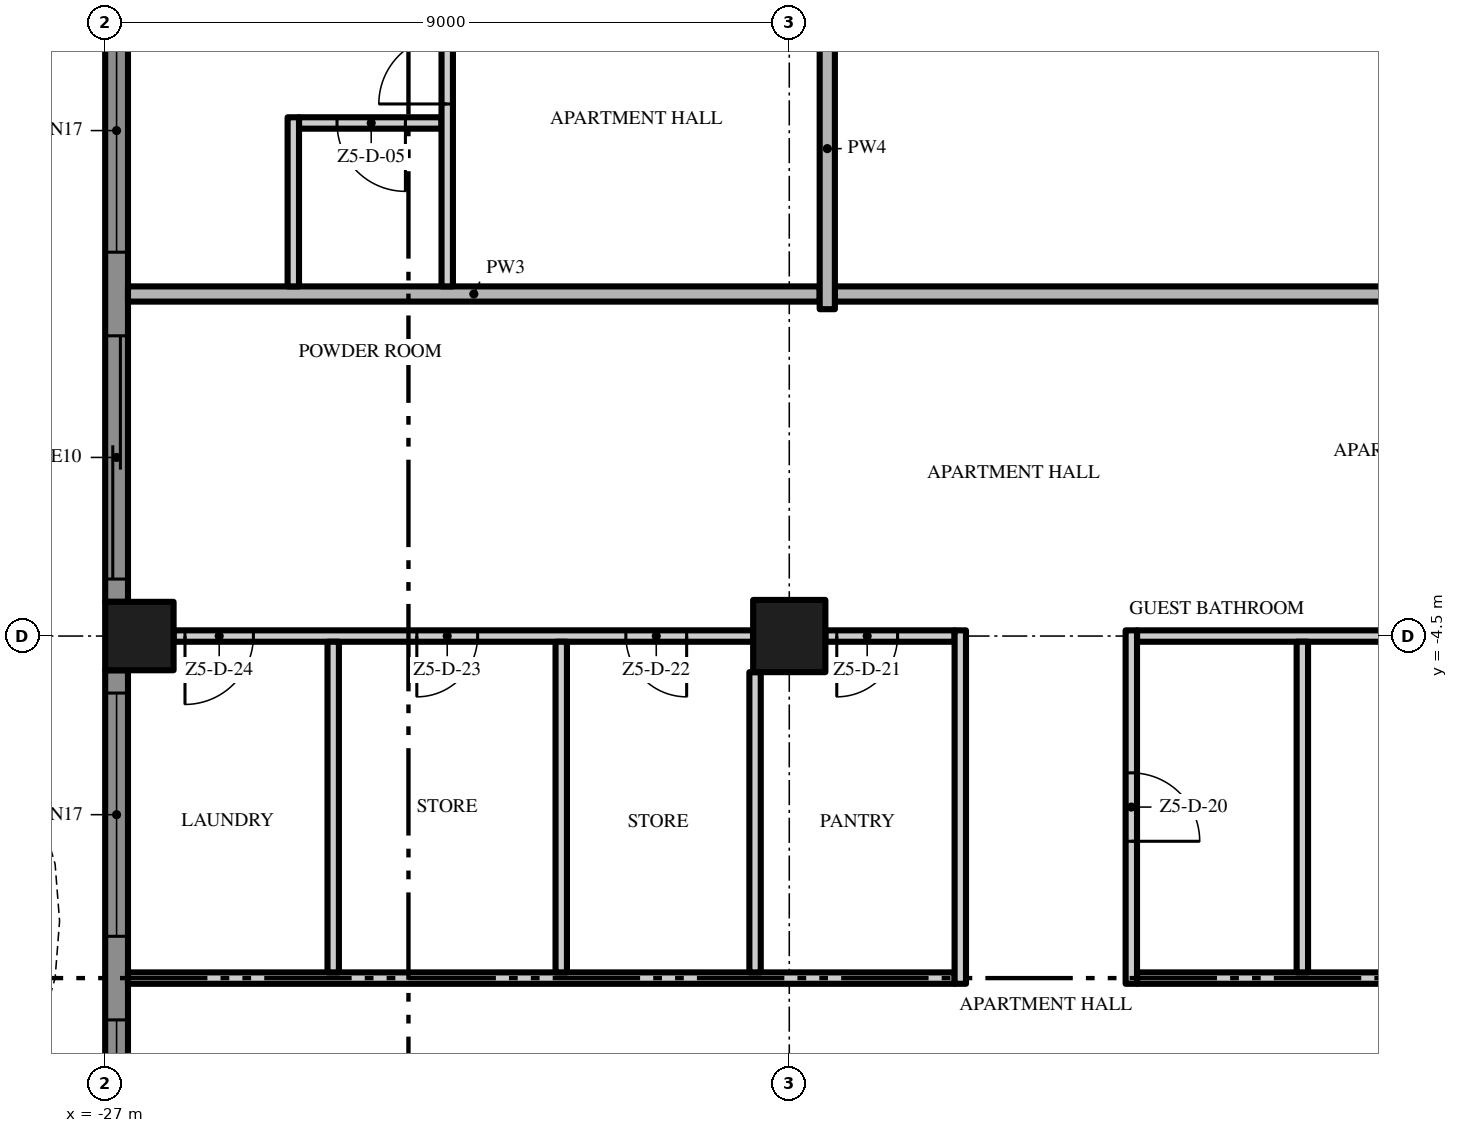
"""IFC4 building model, lengths in metres.
Left out: names, types, materials, properties, quantities, classifications, styles, units other than length and angle.
Written with IfcOpenShell. Run it as: python <this file> out.ifc"""

import sys

from ifc_helpers import new_model, si_unit, direction, frame, frame_2d, origin, origin_2d, place, context, subcontext, project, spatial, polyline, rectangle, outline, extrude, element, fill, save


model = new_model("IFC4")
c1 = context("Model", 3, precision=1e-05, world=origin(), true_north=direction((0.0, 1.0)))
c2 = subcontext(c1, "Body", "Model", "MODEL_VIEW")
j1 = project(units=[si_unit("LENGTHUNIT", "METRE"), si_unit("PLANEANGLEUNIT", "RADIAN")], contexts=[c1])
p1 = place(None, origin())
s1 = spatial("IfcSite", under=j1, at=p1, CompositionType="ELEMENT")
p2 = place(p1, origin())
s2 = spatial("IfcBuilding", under=s1, at=p2, CompositionType="ELEMENT")
p3 = place(p2, frame((0.0, 0.0, 273.0)))
s3 = spatial("IfcBuildingStorey", under=s2, at=p3, CompositionType="ELEMENT", Elevation=273.0)
p4 = place(p3, frame((-18.0, -4.5, 0.0), z_axis=(0.0, 0.0, 1.0), x_axis=(1.0, 0.0, 0.0)))
e1 = element("IfcColumn", 1, at=p4, inside=s3, PredefinedType="COLUMN", context=c2, shape_type="SweptSolid", body=[
    extrude(rectangle(XDim=0.95, YDim=0.95, at=origin_2d()), origin(), (0.0, 0.0, 1.0), 3.5),
])
p5 = place(p3, frame((-26.55, -4.5, 0.0), z_axis=(0.0, 0.0, 1.0), x_axis=(1.0, 0.0, 0.0)))
e2 = element("IfcColumn", 2, at=p5, inside=s3, PredefinedType="COLUMN", context=c2, shape_type="SweptSolid", body=[
    extrude(rectangle(XDim=0.9, YDim=0.9, at=origin_2d()), origin(), (0.0, 0.0, 1.0), 3.5),
])
p6 = place(p3, frame((-26.85, -4.05, 0.0), z_axis=(0.0, 0.0, 1.0), x_axis=(0.0, 1.0, 0.0)))
e3 = element("IfcWall", 3, at=p6, inside=s3, PredefinedType="SOLIDWALL", context=c2, shape_type="SweptSolid", body=[
    extrude(rectangle(XDim=8.1, YDim=0.3, at=frame_2d((4.05, 0.0))), origin(), (0.0, 0.0, 1.0), 3.5),
])
p7 = place(p6, frame((4.6, 0.0, 0.45)))
e4 = element("IfcOpeningElement", 4, at=p7, cuts=e3, PredefinedType="OPENING", context=c2, shape_type="SweptSolid", body=[
    extrude(rectangle(XDim=3.2, YDim=2.65, at=frame_2d((1.6, 1.325))), frame((0.0, 0.16, 0.0), z_axis=(0.0, -1.0, 0.0), x_axis=(1.0, 0.0, 0.0)), (0.0, 0.0, 1.0), 0.32),
])
p8 = place(p6, frame((0.3, 0.0, 0.0)))
e5 = element("IfcOpeningElement", 5, at=p8, cuts=e3, PredefinedType="OPENING", context=c2, shape_type="SweptSolid", body=[
    extrude(rectangle(XDim=3.2, YDim=2.4, at=frame_2d((1.6, 1.2))), frame((0.0, 0.16, 0.0), z_axis=(0.0, -1.0, 0.0), x_axis=(1.0, 0.0, 0.0)), (0.0, 0.0, 1.0), 0.32),
])
p9 = place(p3, frame((-26.85, -13.05, 0.0), z_axis=(0.0, 0.0, 1.0), x_axis=(0.0, 1.0, 0.0)))
e6 = element("IfcWall", 6, at=p9, inside=s3, PredefinedType="SOLIDWALL", context=c2, shape_type="SweptSolid", body=[
    extrude(rectangle(XDim=8.1, YDim=0.3, at=frame_2d((4.05, 0.0))), origin(), (0.0, 0.0, 1.0), 3.5),
])
p10 = place(p9, frame((4.6, 0.0, 0.45)))
e7 = element("IfcOpeningElement", 7, at=p10, cuts=e6, PredefinedType="OPENING", context=c2, shape_type="SweptSolid", body=[
    extrude(rectangle(XDim=3.2, YDim=2.65, at=frame_2d((1.6, 1.325))), frame((0.0, 0.16, 0.0), z_axis=(0.0, -1.0, 0.0), x_axis=(1.0, 0.0, 0.0)), (0.0, 0.0, 1.0), 0.32),
])
p11 = place(p9, frame((0.3, 0.0, 0.45)))
e8 = element("IfcOpeningElement", 8, at=p11, cuts=e6, PredefinedType="OPENING", context=c2, shape_type="SweptSolid", body=[
    extrude(rectangle(XDim=3.2, YDim=2.65, at=frame_2d((1.6, 1.325))), frame((0.0, 0.16, 0.0), z_axis=(0.0, -1.0, 0.0), x_axis=(1.0, 0.0, 0.0)), (0.0, 0.0, 1.0), 0.32),
])
p12 = place(p3, origin())
e9 = element("IfcWall", 9, at=p12, inside=s3, PredefinedType="USERDEFINED", context=c2, shape_type="SweptSolid", body=[
    extrude(outline(polyline([(-28.8, 18.0), (-29.505, 16.5), (-29.941, 15.0), (-30.0, 14.25), (-29.941, 13.5), (-29.505, 12.0), (-28.8, 10.5), (-28.095, 9.0), (-27.659, 7.5), (-27.6, 6.75), (-27.659, 6.0), (-28.095, 4.5), (-28.8, 3.0), (-29.505, 1.5), (-29.941, 0.0), (-30.0, -0.75), (-29.941, -1.5), (-29.505, -3.0), (-28.8, -4.5), (-28.095, -6.0), (-27.659, -7.5), (-27.6, -8.25), (-27.659, -9.0), (-28.095, -10.5), (-28.8, -12.0), (-29.505, -13.5), (-29.941, -15.0), (-30.0, -15.75), (-29.941, -16.5), (-29.505, -18.0), (-29.265, -17.93), (-29.694, -16.455), (-29.749, -15.75), (-29.694, -15.045), (-29.271, -13.589), (-28.574, -12.106), (-27.86, -10.589), (-27.411, -9.045), (-27.349, -8.25), (-27.411, -7.455), (-27.86, -5.911), (-28.574, -4.394), (-29.271, -2.911), (-29.694, -1.455), (-29.749, -0.75), (-29.694, -0.045), (-29.271, 1.411), (-28.574, 2.894), (-27.86, 4.411), (-27.411, 5.955), (-27.349, 6.75), (-27.411, 7.545), (-27.86, 9.089), (-28.574, 10.606), (-29.271, 12.089), (-29.694, 13.545), (-29.749, 14.25), (-29.694, 14.955), (-29.271, 16.411), (-28.574, 17.894), (-28.8, 18.0)])), origin(), (0.0, 0.0, 1.0), 0.9),
])
p13 = place(p3, frame((-26.7, -9.0, 0.0), z_axis=(0.0, 0.0, 1.0), x_axis=(1.0, 0.0, 0.0)))
e10 = element("IfcWall", 10, at=p13, inside=s3, PredefinedType="PARTITIONING", context=c2, shape_type="SweptSolid", body=[
    extrude(rectangle(XDim=10.875, YDim=0.15, at=frame_2d((5.438, 0.0))), origin(), (0.0, 0.0, 1.0), 3.5),
])
p14 = place(p3, frame((-13.425, -9.0, 0.0), z_axis=(0.0, 0.0, 1.0), x_axis=(1.0, 0.0, 0.0)))
e11 = element("IfcWall", 11, at=p14, inside=s3, PredefinedType="PARTITIONING", context=c2, shape_type="SweptSolid", body=[
    extrude(rectangle(XDim=13.325, YDim=0.15, at=frame_2d((6.662, 0.0))), origin(), (0.0, 0.0, 1.0), 3.5),
])
p15 = place(p14, frame((4.675, 0.0, 0.0)))
e12 = element("IfcOpeningElement", 12, at=p15, cuts=e11, PredefinedType="OPENING", context=c2, shape_type="SweptSolid", body=[
    extrude(rectangle(XDim=1.0, YDim=2.4, at=frame_2d((0.5, 1.2))), frame((0.0, 0.085, 0.0), z_axis=(0.0, -1.0, 0.0), x_axis=(1.0, 0.0, 0.0)), (0.0, 0.0, 1.0), 0.17),
])
p16 = place(p3, frame((-18.475, -4.5, 0.0), z_axis=(0.0, 0.0, 1.0), x_axis=(-1.0, 0.0, 0.0)))
e13 = element("IfcWall", 13, at=p16, inside=s3, PredefinedType="PARTITIONING", context=c2, shape_type="SweptSolid", body=[
    extrude(rectangle(XDim=7.625, YDim=0.15, at=frame_2d((3.812, 0.0))), origin(), (0.0, 0.0, 1.0), 3.5),
])
p17 = place(p16, frame((0.875, 0.0, 0.0)))
e14 = element("IfcOpeningElement", 14, at=p17, cuts=e13, PredefinedType="OPENING", context=c2, shape_type="SweptSolid", body=[
    extrude(rectangle(XDim=0.8, YDim=2.0, at=frame_2d((0.4, 1.0))), frame((0.0, 0.085, 0.0), z_axis=(0.0, -1.0, 0.0), x_axis=(1.0, 0.0, 0.0)), (0.0, 0.0, 1.0), 0.17),
])
p18 = place(p16, frame((3.625, 0.0, 0.0)))
e15 = element("IfcOpeningElement", 15, at=p18, cuts=e13, PredefinedType="OPENING", context=c2, shape_type="SweptSolid", body=[
    extrude(rectangle(XDim=0.8, YDim=2.0, at=frame_2d((0.4, 1.0))), frame((0.0, 0.085, 0.0), z_axis=(0.0, -1.0, 0.0), x_axis=(1.0, 0.0, 0.0)), (0.0, 0.0, 1.0), 0.17),
])
p19 = place(p16, frame((6.575, 0.0, 0.0)))
e16 = element("IfcOpeningElement", 16, at=p19, cuts=e13, PredefinedType="OPENING", context=c2, shape_type="SweptSolid", body=[
    extrude(rectangle(XDim=0.9, YDim=2.1, at=frame_2d((0.45, 1.05))), frame((0.0, 0.085, 0.0), z_axis=(0.0, -1.0, 0.0), x_axis=(1.0, 0.0, 0.0)), (0.0, 0.0, 1.0), 0.17),
])
p20 = place(p3, frame((-15.825, -4.5, 0.0), z_axis=(0.0, 0.0, 1.0), x_axis=(-1.0, 0.0, 0.0)))
e17 = element("IfcWall", 17, at=p20, inside=s3, PredefinedType="PARTITIONING", context=c2, shape_type="SweptSolid", body=[
    extrude(rectangle(XDim=1.7, YDim=0.15, at=frame_2d((0.85, 0.0))), origin(), (0.0, 0.0, 1.0), 3.5),
])
p21 = place(p20, frame((0.75, 0.0, 0.0)))
e18 = element("IfcOpeningElement", 18, at=p21, cuts=e17, PredefinedType="OPENING", context=c2, shape_type="SweptSolid", body=[
    extrude(rectangle(XDim=0.8, YDim=2.0, at=frame_2d((0.4, 1.0))), frame((0.0, 0.085, 0.0), z_axis=(0.0, -1.0, 0.0), x_axis=(1.0, 0.0, 0.0)), (0.0, 0.0, 1.0), 0.17),
])
p22 = place(p3, frame((-13.425, -4.5, 0.0), z_axis=(0.0, 0.0, 1.0), x_axis=(1.0, 0.0, 0.0)))
e19 = element("IfcWall", 19, at=p22, inside=s3, PredefinedType="PARTITIONING", context=c2, shape_type="SweptSolid", body=[
    extrude(rectangle(XDim=3.95, YDim=0.15, at=frame_2d((1.975, 0.0))), origin(), (0.0, 0.0, 1.0), 3.5),
])
p23 = place(p3, frame((17.4, 0.0, 0.0), z_axis=(0.0, 0.0, 1.0), x_axis=(-1.0, 0.0, 0.0)))
e20 = element("IfcWall", 20, at=p23, inside=s3, PredefinedType="PARTITIONING", context=c2, shape_type="SweptSolid", body=[
    extrude(rectangle(XDim=34.8, YDim=0.2, at=frame_2d((17.4, 0.0))), origin(), (0.0, 0.0, 1.0), 3.5),
])
p24 = place(p23, frame((25.65, 0.0, 0.0)))
e21 = element("IfcOpeningElement", 21, at=p24, cuts=e20, PredefinedType="OPENING", context=c2, shape_type="SweptSolid", body=[
    extrude(rectangle(XDim=1.5, YDim=2.4, at=frame_2d((0.75, 1.2))), frame((0.0, 0.11, 0.0), z_axis=(0.0, -1.0, 0.0), x_axis=(1.0, 0.0, 0.0)), (0.0, 0.0, 1.0), 0.22),
])
p25 = place(p23, frame((7.65, 0.0, 0.0)))
e22 = element("IfcOpeningElement", 22, at=p25, cuts=e20, PredefinedType="OPENING", context=c2, shape_type="SweptSolid", body=[
    extrude(rectangle(XDim=1.5, YDim=2.4, at=frame_2d((0.75, 1.2))), frame((0.0, 0.11, 0.0), z_axis=(0.0, -1.0, 0.0), x_axis=(1.0, 0.0, 0.0)), (0.0, 0.0, 1.0), 0.22),
])
p26 = place(p3, frame((-26.7, 0.0, 0.0), z_axis=(0.0, 0.0, 1.0), x_axis=(1.0, 0.0, 0.0)))
e23 = element("IfcWall", 23, at=p26, inside=s3, PredefinedType="PARTITIONING", context=c2, shape_type="SweptSolid", body=[
    extrude(rectangle(XDim=9.1, YDim=0.2, at=frame_2d((4.55, 0.0))), origin(), (0.0, 0.0, 1.0), 3.5),
])
p27 = place(p3, frame((-22.575, 2.25, 0.0), z_axis=(0.0, 0.0, 1.0), x_axis=(-1.0, 0.0, 0.0)))
e24 = element("IfcWall", 24, at=p27, inside=s3, PredefinedType="PARTITIONING", context=c2, shape_type="SweptSolid", body=[
    extrude(rectangle(XDim=1.875, YDim=0.15, at=frame_2d((0.938, 0.0))), origin(), (0.0, 0.0, 1.0), 3.5),
])
p28 = place(p27, frame((0.475, 0.0, 0.0)))
e25 = element("IfcOpeningElement", 25, at=p28, cuts=e24, PredefinedType="OPENING", context=c2, shape_type="SweptSolid", body=[
    extrude(rectangle(XDim=0.9, YDim=2.1, at=frame_2d((0.45, 1.05))), frame((0.0, 0.085, 0.0), z_axis=(0.0, -1.0, 0.0), x_axis=(1.0, 0.0, 0.0)), (0.0, 0.0, 1.0), 0.17),
])
p29 = place(p3, frame((-24.525, 0.1, 0.0), z_axis=(0.0, 0.0, 1.0), x_axis=(0.0, 1.0, 0.0)))
e26 = element("IfcWall", 26, at=p29, inside=s3, PredefinedType="PARTITIONING", context=c2, shape_type="SweptSolid", body=[
    extrude(rectangle(XDim=2.225, YDim=0.15, at=frame_2d((1.113, 0.0))), origin(), (0.0, 0.0, 1.0), 3.5),
])
p30 = place(p3, frame((-24.0, -8.925, 0.0), z_axis=(0.0, 0.0, 1.0), x_axis=(0.0, 1.0, 0.0)))
e27 = element("IfcWall", 27, at=p30, inside=s3, PredefinedType="PARTITIONING", context=c2, shape_type="SweptSolid", body=[
    extrude(rectangle(XDim=4.35, YDim=0.15, at=frame_2d((2.175, 0.0))), origin(), (0.0, 0.0, 1.0), 3.5),
])
p31 = place(p3, frame((-22.5, 0.1, 0.0), z_axis=(0.0, 0.0, 1.0), x_axis=(0.0, 1.0, 0.0)))
e28 = element("IfcWall", 28, at=p31, inside=s3, PredefinedType="PARTITIONING", context=c2, shape_type="SweptSolid", body=[
    extrude(rectangle(XDim=17.45, YDim=0.15, at=frame_2d((8.725, 0.0))), origin(), (0.0, 0.0, 1.0), 3.5),
])
p32 = place(p31, frame((2.4, 0.0, 0.0)))
e29 = element("IfcOpeningElement", 29, at=p32, cuts=e28, PredefinedType="OPENING", context=c2, shape_type="SweptSolid", body=[
    extrude(rectangle(XDim=1.8, YDim=2.4, at=frame_2d((0.9, 1.2))), frame((0.0, 0.085, 0.0), z_axis=(0.0, -1.0, 0.0), x_axis=(1.0, 0.0, 0.0)), (0.0, 0.0, 1.0), 0.17),
])
p33 = place(p31, frame((10.65, 0.0, 0.0)))
e30 = element("IfcOpeningElement", 30, at=p33, cuts=e28, PredefinedType="OPENING", context=c2, shape_type="SweptSolid", body=[
    extrude(rectangle(XDim=1.0, YDim=2.4, at=frame_2d((0.5, 1.2))), frame((0.0, 0.085, 0.0), z_axis=(0.0, -1.0, 0.0), x_axis=(1.0, 0.0, 0.0)), (0.0, 0.0, 1.0), 0.17),
])
p34 = place(p3, frame((-21.0, -8.925, 0.0), z_axis=(0.0, 0.0, 1.0), x_axis=(0.0, 1.0, 0.0)))
e31 = element("IfcWall", 31, at=p34, inside=s3, PredefinedType="PARTITIONING", context=c2, shape_type="SweptSolid", body=[
    extrude(rectangle(XDim=4.35, YDim=0.15, at=frame_2d((2.175, 0.0))), origin(), (0.0, 0.0, 1.0), 3.5),
])
p35 = place(p3, frame((-18.45, -8.925, 0.0), z_axis=(0.0, 0.0, 1.0), x_axis=(0.0, 1.0, 0.0)))
e32 = element("IfcWall", 32, at=p35, inside=s3, PredefinedType="PARTITIONING", context=c2, shape_type="SweptSolid", body=[
    extrude(rectangle(XDim=3.95, YDim=0.15, at=frame_2d((1.975, 0.0))), origin(), (0.0, 0.0, 1.0), 3.5),
])
p36 = place(p3, frame((-17.5, -0.2, 0.0), z_axis=(0.0, 0.0, 1.0), x_axis=(0.0, 1.0, 0.0)))
e33 = element("IfcWall", 33, at=p36, inside=s3, PredefinedType="PARTITIONING", context=c2, shape_type="SweptSolid", body=[
    extrude(rectangle(XDim=4.225, YDim=0.2, at=frame_2d((2.112, 0.0))), origin(), (0.0, 0.0, 1.0), 3.5),
])
p37 = place(p3, frame((-15.75, -9.075, 0.0), z_axis=(0.0, 0.0, 1.0), x_axis=(0.0, 1.0, 0.0)))
e34 = element("IfcWall", 34, at=p37, inside=s3, PredefinedType="PARTITIONING", context=c2, shape_type="SweptSolid", body=[
    extrude(rectangle(XDim=4.65, YDim=0.15, at=frame_2d((2.325, 0.0))), origin(), (0.0, 0.0, 1.0), 3.5),
])
p38 = place(p3, frame((-13.5, -4.425, 0.0), z_axis=(0.0, 0.0, 1.0), x_axis=(0.0, -1.0, 0.0)))
e35 = element("IfcWall", 35, at=p38, inside=s3, PredefinedType="PARTITIONING", context=c2, shape_type="SweptSolid", body=[
    extrude(rectangle(XDim=4.65, YDim=0.15, at=frame_2d((2.325, 0.0))), origin(), (0.0, 0.0, 1.0), 3.5),
])
p39 = place(p38, frame((1.875, 0.0, 0.0)))
e36 = element("IfcOpeningElement", 36, at=p39, cuts=e35, PredefinedType="OPENING", context=c2, shape_type="SweptSolid", body=[
    extrude(rectangle(XDim=0.9, YDim=2.1, at=frame_2d((0.45, 1.05))), frame((0.0, 0.085, 0.0), z_axis=(0.0, -1.0, 0.0), x_axis=(1.0, 0.0, 0.0)), (0.0, 0.0, 1.0), 0.17),
])
p40 = place(p3, frame((-11.25, -8.925, 0.0), z_axis=(0.0, 0.0, 1.0), x_axis=(0.0, 1.0, 0.0)))
e37 = element("IfcWall", 37, at=p40, inside=s3, PredefinedType="PARTITIONING", context=c2, shape_type="SweptSolid", body=[
    extrude(rectangle(XDim=4.35, YDim=0.15, at=frame_2d((2.175, 0.0))), origin(), (0.0, 0.0, 1.0), 3.5),
])
p41 = place(p7, origin())
e38 = element("IfcWindow", 38, at=p41, inside=s3, PartitioningType="SINGLE_PANEL", PredefinedType="WINDOW", context=c2, shape_type="SweptSolid", body=[
    extrude(rectangle(XDim=3.2, YDim=2.65, at=frame_2d((1.6, 1.325))), frame((0.0, 0.03, 0.0), z_axis=(0.0, -1.0, 0.0), x_axis=(1.0, 0.0, 0.0)), (0.0, 0.0, 1.0), 0.06),
])
fill(e4, e38)
p42 = place(p8, origin())
e39 = element("IfcDoor", 39, at=p42, inside=s3, OperationType="SINGLE_SWING_LEFT", PredefinedType="DOOR", context=c2, shape_type="SweptSolid", body=[
    extrude(rectangle(XDim=3.2, YDim=2.4, at=frame_2d((1.6, 1.2))), frame((0.0, 0.025, 0.0), z_axis=(0.0, -1.0, 0.0), x_axis=(1.0, 0.0, 0.0)), (0.0, 0.0, 1.0), 0.05),
])
fill(e5, e39)
p43 = place(p10, origin())
e40 = element("IfcWindow", 40, at=p43, inside=s3, PartitioningType="SINGLE_PANEL", PredefinedType="WINDOW", context=c2, shape_type="SweptSolid", body=[
    extrude(rectangle(XDim=3.2, YDim=2.65, at=frame_2d((1.6, 1.325))), frame((0.0, 0.03, 0.0), z_axis=(0.0, -1.0, 0.0), x_axis=(1.0, 0.0, 0.0)), (0.0, 0.0, 1.0), 0.06),
])
fill(e7, e40)
p44 = place(p11, origin())
e41 = element("IfcWindow", 41, at=p44, inside=s3, PartitioningType="SINGLE_PANEL", PredefinedType="WINDOW", context=c2, shape_type="SweptSolid", body=[
    extrude(rectangle(XDim=3.2, YDim=2.65, at=frame_2d((1.6, 1.325))), frame((0.0, 0.03, 0.0), z_axis=(0.0, -1.0, 0.0), x_axis=(1.0, 0.0, 0.0)), (0.0, 0.0, 1.0), 0.06),
])
fill(e8, e41)
p45 = place(p32, origin())
e42 = element("IfcDoor", 42, at=p45, inside=s3, OperationType="DOUBLE_DOOR_SINGLE_SWING", PredefinedType="DOOR", context=c2, shape_type="SweptSolid", body=[
    extrude(rectangle(XDim=1.8, YDim=2.4, at=frame_2d((0.9, 1.2))), frame((0.0, 0.025, 0.0), z_axis=(0.0, -1.0, 0.0), x_axis=(1.0, 0.0, 0.0)), (0.0, 0.0, 1.0), 0.05),
])
fill(e29, e42)
p46 = place(p28, origin())
e43 = element("IfcDoor", 43, at=p46, inside=s3, OperationType="SINGLE_SWING_LEFT", PredefinedType="DOOR", context=c2, shape_type="SweptSolid", body=[
    extrude(rectangle(XDim=0.9, YDim=2.1, at=frame_2d((0.45, 1.05))), frame((0.0, 0.025, 0.0), z_axis=(0.0, -1.0, 0.0), x_axis=(1.0, 0.0, 0.0)), (0.0, 0.0, 1.0), 0.05),
])
fill(e25, e43)
p47 = place(p39, origin())
e44 = element("IfcDoor", 44, at=p47, inside=s3, OperationType="SINGLE_SWING_RIGHT", PredefinedType="DOOR", context=c2, shape_type="SweptSolid", body=[
    extrude(rectangle(XDim=0.9, YDim=2.1, at=frame_2d((0.45, 1.05))), frame((0.0, 0.025, 0.0), z_axis=(0.0, -1.0, 0.0), x_axis=(1.0, 0.0, 0.0)), (0.0, 0.0, 1.0), 0.05),
])
fill(e36, e44)
p48 = place(p21, origin())
e45 = element("IfcDoor", 45, at=p48, inside=s3, OperationType="SINGLE_SWING_RIGHT", PredefinedType="DOOR", context=c2, shape_type="SweptSolid", body=[
    extrude(rectangle(XDim=0.8, YDim=2.0, at=frame_2d((0.4, 1.0))), frame((0.0, 0.025, 0.0), z_axis=(0.0, -1.0, 0.0), x_axis=(1.0, 0.0, 0.0)), (0.0, 0.0, 1.0), 0.05),
])
fill(e18, e45)
p49 = place(p17, origin())
e46 = element("IfcDoor", 46, at=p49, inside=s3, OperationType="SINGLE_SWING_LEFT", PredefinedType="DOOR", context=c2, shape_type="SweptSolid", body=[
    extrude(rectangle(XDim=0.8, YDim=2.0, at=frame_2d((0.4, 1.0))), frame((0.0, 0.025, 0.0), z_axis=(0.0, -1.0, 0.0), x_axis=(1.0, 0.0, 0.0)), (0.0, 0.0, 1.0), 0.05),
])
fill(e14, e46)
p50 = place(p18, origin())
e47 = element("IfcDoor", 47, at=p50, inside=s3, OperationType="SINGLE_SWING_RIGHT", PredefinedType="DOOR", context=c2, shape_type="SweptSolid", body=[
    extrude(rectangle(XDim=0.8, YDim=2.0, at=frame_2d((0.4, 1.0))), frame((0.0, 0.025, 0.0), z_axis=(0.0, -1.0, 0.0), x_axis=(1.0, 0.0, 0.0)), (0.0, 0.0, 1.0), 0.05),
])
fill(e15, e47)
p51 = place(p19, origin())
e48 = element("IfcDoor", 48, at=p51, inside=s3, OperationType="SINGLE_SWING_RIGHT", PredefinedType="DOOR", context=c2, shape_type="SweptSolid", body=[
    extrude(rectangle(XDim=0.9, YDim=2.1, at=frame_2d((0.45, 1.05))), frame((0.0, 0.025, 0.0), z_axis=(0.0, -1.0, 0.0), x_axis=(1.0, 0.0, 0.0)), (0.0, 0.0, 1.0), 0.05),
])
fill(e16, e48)
save(model, sys.argv[1])
